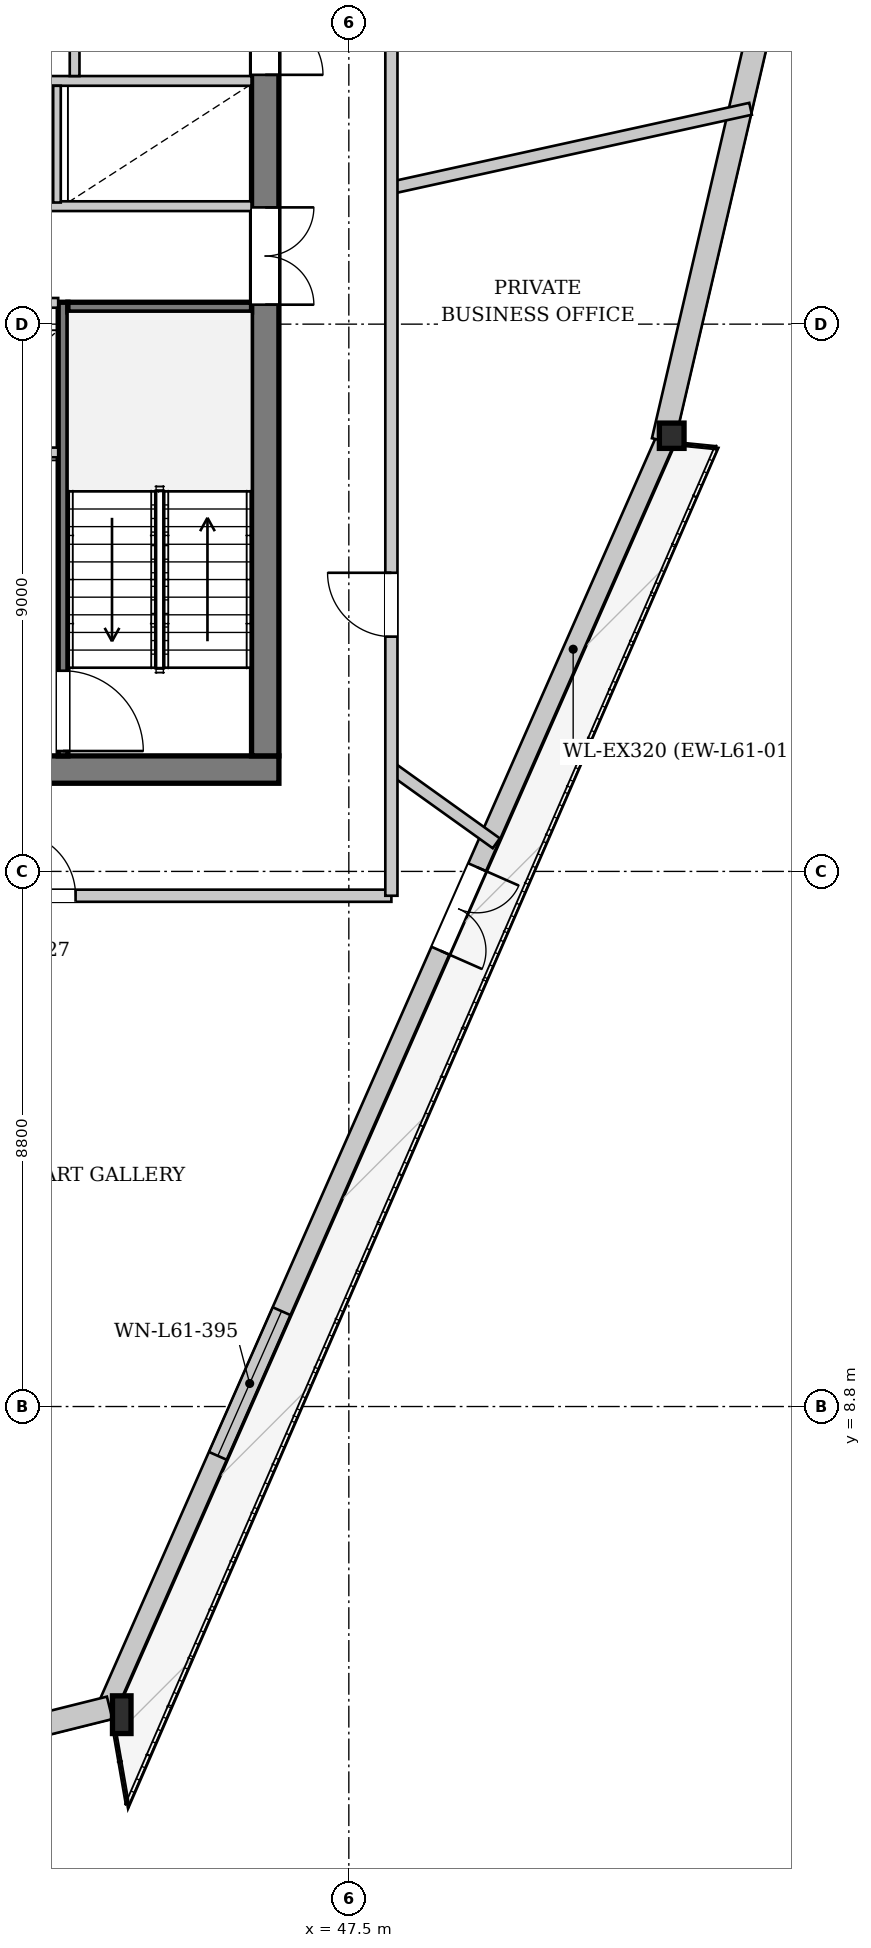
"""IFC4 building model, lengths in metres.
Left out: names, types, materials, properties, quantities, classifications, styles, units other than length and angle.
Written with IfcOpenShell. Run it as: python <this file> out.ifc"""

import sys

from ifc_helpers import new_model, si_unit, direction, frame, frame_2d, origin, origin_2d, place, context, subcontext, project, spatial, rectangle, i_section, extrude, source, transform, mapped, element, fill, save


model = new_model("IFC4")
c1 = context("Model", 3, precision=1e-05, world=origin(), true_north=direction((0.0, 1.0)))
c2 = subcontext(c1, "Body", "Model", "MODEL_VIEW")
j1 = project(units=[si_unit("LENGTHUNIT", "METRE"), si_unit("PLANEANGLEUNIT", "RADIAN")], contexts=[c1])
p1 = place(None, origin())
s1 = spatial("IfcSite", under=j1, at=p1, CompositionType="ELEMENT")
p2 = place(p1, origin())
s2 = spatial("IfcBuilding", under=s1, at=p2, CompositionType="ELEMENT")
p3 = place(p2, frame((0.0, 0.0, 230.9)))
s3 = spatial("IfcBuildingStorey", under=s2, at=p3, CompositionType="ELEMENT", Elevation=230.9)
m1 = source(origin(), c2, "Body", "SweptSolid", [
    extrude(i_section(OverallWidth=0.305, OverallDepth=0.62, WebThickness=0.021, FlangeThickness=0.04, at=origin_2d()), origin(), (0.0, 0.0, 1.0), 3.451),
])
p4 = place(p3, frame((43.613, 3.66, 0.0), z_axis=(0.088135401789, 0.041662722034, 0.995236840428), x_axis=(-0.427368834073, 0.90407736376, 0.0)))
e1 = element("IfcColumn", 1, at=p4, inside=s3, PredefinedType="COLUMN", context=c2, shape_type="MappedRepresentation", body=[
    mapped(m1, transform((0.0, 0.0, 0.0), x_axis=(1.0, 0.0, 0.0), y_axis=(0.0, 1.0, 0.0), z_axis=(0.0, 0.0, 1.0), scale=1.0)),
])
m2 = source(origin(), c2, "Body", "SweptSolid", [
    extrude(i_section(OverallWidth=0.406, OverallDepth=0.416, WebThickness=0.027, FlangeThickness=0.042, at=origin_2d()), origin(), (0.0, 0.0, 1.0), 3.446),
])
p5 = place(p3, frame((52.855, 24.637, 0.0), z_axis=(-0.025932889628, 0.073901649952, 0.996928298008), x_axis=(-0.943590064598, -0.331115976647, 0.0)))
e2 = element("IfcColumn", 2, at=p5, inside=s3, PredefinedType="COLUMN", context=c2, shape_type="MappedRepresentation", body=[
    mapped(m2, transform((0.0, 0.0, 0.0), x_axis=(1.0, 0.0, 0.0), y_axis=(0.0, 1.0, 0.0), z_axis=(0.0, 0.0, 1.0), scale=1.0)),
])
p6 = place(p3, frame((52.708, 24.702, 0.0), z_axis=(0.0, 0.0, 1.0), x_axis=(-0.403169735339, -0.915125217938, 0.0)))
e3 = element("IfcWall", 3, at=p6, inside=s3, PredefinedType="SOLIDWALL", context=c2, shape_type="SweptSolid", body=[
    extrude(rectangle(XDim=22.923, YDim=0.32, at=frame_2d((11.461, 0.0))), origin(), (0.0, 0.0, 1.0), 2.872),
])
p7 = place(p6, frame((7.685, 0.0, 0.0)))
e4 = element("IfcOpeningElement", 4, at=p7, cuts=e3, PredefinedType="OPENING", context=c2, shape_type="SweptSolid", body=[
    extrude(rectangle(XDim=1.5, YDim=2.3, at=frame_2d((0.75, 1.15))), frame((0.0, 0.17, 0.0), z_axis=(0.0, -1.0, 0.0), x_axis=(1.0, 0.0, 0.0)), (0.0, 0.0, 1.0), 0.34),
])
p8 = place(p6, frame((15.663, 0.0, 0.402)))
e5 = element("IfcOpeningElement", 5, at=p8, cuts=e3, PredefinedType="OPENING", context=c2, shape_type="SweptSolid", body=[
    extrude(rectangle(XDim=2.6, YDim=2.35, at=frame_2d((1.3, 1.175))), frame((0.0, 0.17, 0.0), z_axis=(0.0, -1.0, 0.0), x_axis=(1.0, 0.0, 0.0)), (0.0, 0.0, 1.0), 0.34),
])
p9 = place(p3, frame((43.567, 3.845, 0.0), z_axis=(0.0, 0.0, 1.0), x_axis=(-0.970284902679, -0.241965302541, 0.0)))
e6 = element("IfcWall", 6, at=p9, inside=s3, PredefinedType="SOLIDWALL", context=c2, shape_type="SweptSolid", body=[
    extrude(rectangle(XDim=3.626, YDim=0.38, at=frame_2d((1.813, 0.0))), origin(), (0.0, 0.0, 1.0), 2.872),
])
p10 = place(p3, frame((57.875, 47.004, 0.0), z_axis=(0.0, 0.0, 1.0), x_axis=(-0.227070358906, -0.973878355908, 0.0)))
e7 = element("IfcWall", 7, at=p10, inside=s3, PredefinedType="SOLIDWALL", context=c2, shape_type="SweptSolid", body=[
    extrude(rectangle(XDim=22.923, YDim=0.38, at=frame_2d((11.461, 0.0))), origin(), (0.0, 0.0, 1.0), 2.872),
])
p11 = place(p10, frame((5.318, 0.0, 0.502)))
e8 = element("IfcOpeningElement", 8, at=p11, cuts=e7, PredefinedType="OPENING", context=c2, shape_type="SweptSolid", body=[
    extrude(rectangle(XDim=2.2, YDim=2.25, at=frame_2d((1.1, 1.125))), frame((0.0, 0.2, 0.0), z_axis=(0.0, -1.0, 0.0), x_axis=(1.0, 0.0, 0.0)), (0.0, 0.0, 1.0), 0.4),
])
p12 = place(p10, frame((13.804, 0.0, 0.502)))
e9 = element("IfcOpeningElement", 9, at=p12, cuts=e7, PredefinedType="OPENING", context=c2, shape_type="SweptSolid", body=[
    extrude(rectangle(XDim=2.2, YDim=2.25, at=frame_2d((1.1, 1.125))), frame((0.0, 0.2, 0.0), z_axis=(0.0, -1.0, 0.0), x_axis=(1.0, 0.0, 0.0)), (0.0, 0.0, 1.0), 0.4),
])
p13 = place(p3, frame((46.35, 19.275, 0.0), z_axis=(0.0, 0.0, 1.0), x_axis=(-1.0, 0.0, 0.0)))
e10 = element("IfcWall", 10, at=p13, inside=s3, PredefinedType="SHEAR", context=c2, shape_type="SweptSolid", body=[
    extrude(rectangle(XDim=16.7, YDim=0.45, at=frame_2d((8.35, 0.0))), origin(), (0.0, 0.0, 1.0), 3.38),
])
p14 = place(p13, frame((4.55, 0.0, 0.0)))
e11 = element("IfcOpeningElement", 11, at=p14, cuts=e10, PredefinedType="OPENING", context=c2, shape_type="SweptSolid", body=[
    extrude(rectangle(XDim=1.12, YDim=2.25, at=frame_2d((0.56, 1.125))), frame((0.0, 0.235, 0.0), z_axis=(0.0, -1.0, 0.0), x_axis=(1.0, 0.0, 0.0)), (0.0, 0.0, 1.0), 0.47),
])
p15 = place(p13, frame((11.05, 0.0, 0.0)))
e12 = element("IfcOpeningElement", 12, at=p15, cuts=e10, PredefinedType="OPENING", context=c2, shape_type="SweptSolid", body=[
    extrude(rectangle(XDim=1.12, YDim=2.25, at=frame_2d((0.56, 1.125))), frame((0.0, 0.235, 0.0), z_axis=(0.0, -1.0, 0.0), x_axis=(1.0, 0.0, 0.0)), (0.0, 0.0, 1.0), 0.47),
])
p16 = place(p3, frame((46.125, 33.7, 0.0), z_axis=(0.0, 0.0, 1.0), x_axis=(0.0, -1.0, 0.0)))
e13 = element("IfcWall", 13, at=p16, inside=s3, PredefinedType="SHEAR", context=c2, shape_type="SweptSolid", body=[
    extrude(rectangle(XDim=14.2, YDim=0.45, at=frame_2d((7.1, 0.0))), origin(), (0.0, 0.0, 1.0), 3.38),
])
p17 = place(p16, frame((5.18, 0.0, 0.0)))
e14 = element("IfcOpeningElement", 14, at=p17, cuts=e13, PredefinedType="OPENING", context=c2, shape_type="SweptSolid", body=[
    extrude(rectangle(XDim=1.6, YDim=2.2, at=frame_2d((0.8, 1.1))), frame((0.0, 0.235, 0.0), z_axis=(0.0, -1.0, 0.0), x_axis=(1.0, 0.0, 0.0)), (0.0, 0.0, 1.0), 0.47),
])
p18 = place(p16, frame((2.05, 0.0, 0.0)))
e15 = element("IfcOpeningElement", 15, at=p18, cuts=e13, PredefinedType="OPENING", context=c2, shape_type="SweptSolid", body=[
    extrude(rectangle(XDim=0.95, YDim=2.1, at=frame_2d((0.475, 1.05))), frame((0.0, 0.235, 0.0), z_axis=(0.0, -1.0, 0.0), x_axis=(1.0, 0.0, 0.0)), (0.0, 0.0, 1.0), 0.47),
])
p19 = place(p3, frame((42.8, 26.96, 0.0), z_axis=(0.0, 0.0, 1.0), x_axis=(0.0, -1.0, 0.0)))
e16 = element("IfcWall", 16, at=p19, inside=s3, PredefinedType="PARTITIONING", context=c2, shape_type="SweptSolid", body=[
    extrude(rectangle(XDim=7.46, YDim=0.16, at=frame_2d((3.73, 0.0))), origin(), (0.0, 0.0, 1.0), 3.38),
])
p20 = place(p19, frame((6.06, 0.0, 0.0)))
e17 = element("IfcOpeningElement", 17, at=p20, cuts=e16, PredefinedType="OPENING", context=c2, shape_type="SweptSolid", body=[
    extrude(rectangle(XDim=1.32, YDim=2.2, at=frame_2d((0.66, 1.1))), frame((0.0, 0.09, 0.0), z_axis=(0.0, -1.0, 0.0), x_axis=(1.0, 0.0, 0.0)), (0.0, 0.0, 1.0), 0.18),
])
p21 = place(p3, frame((42.88, 26.88, 0.0), z_axis=(0.0, 0.0, 1.0), x_axis=(1.0, 0.0, 0.0)))
e18 = element("IfcWall", 18, at=p21, inside=s3, PredefinedType="PARTITIONING", context=c2, shape_type="SweptSolid", body=[
    extrude(rectangle(XDim=3.02, YDim=0.16, at=frame_2d((1.51, 0.0))), origin(), (0.0, 0.0, 1.0), 3.38),
])
p22 = place(p3, frame((33.28, 24.49, 0.0), z_axis=(0.0, 0.0, 1.0), x_axis=(1.0, 0.0, 0.0)))
e19 = element("IfcWall", 19, at=p22, inside=s3, PredefinedType="PARTITIONING", context=c2, shape_type="SweptSolid", body=[
    extrude(rectangle(XDim=9.44, YDim=0.16, at=frame_2d((4.72, 0.0))), origin(), (0.0, 0.0, 1.0), 3.38),
])
p23 = place(p3, frame((33.28, 26.95, 0.0), z_axis=(0.0, 0.0, 1.0), x_axis=(1.0, 0.0, 0.0)))
e20 = element("IfcWall", 20, at=p23, inside=s3, PredefinedType="PARTITIONING", context=c2, shape_type="SweptSolid", body=[
    extrude(rectangle(XDim=9.44, YDim=0.16, at=frame_2d((4.72, 0.0))), origin(), (0.0, 0.0, 1.0), 3.38),
])
p24 = place(p23, frame((1.2, 0.0, 0.0)))
e21 = element("IfcOpeningElement", 21, at=p24, cuts=e20, PredefinedType="OPENING", context=c2, shape_type="SweptSolid", body=[
    extrude(rectangle(XDim=0.95, YDim=2.1, at=frame_2d((0.475, 1.05))), frame((0.0, 0.09, 0.0), z_axis=(0.0, -1.0, 0.0), x_axis=(1.0, 0.0, 0.0)), (0.0, 0.0, 1.0), 0.18),
])
p25 = place(p23, frame((4.65, 0.0, 0.0)))
e22 = element("IfcOpeningElement", 22, at=p25, cuts=e20, PredefinedType="OPENING", context=c2, shape_type="SweptSolid", body=[
    extrude(rectangle(XDim=0.95, YDim=2.1, at=frame_2d((0.475, 1.05))), frame((0.0, 0.09, 0.0), z_axis=(0.0, -1.0, 0.0), x_axis=(1.0, 0.0, 0.0)), (0.0, 0.0, 1.0), 0.18),
])
p26 = place(p23, frame((7.67, 0.0, 0.0)))
e23 = element("IfcOpeningElement", 23, at=p26, cuts=e20, PredefinedType="OPENING", context=c2, shape_type="SweptSolid", body=[
    extrude(rectangle(XDim=1.1, YDim=2.2, at=frame_2d((0.55, 1.1))), frame((0.0, 0.09, 0.0), z_axis=(0.0, -1.0, 0.0), x_axis=(1.0, 0.0, 0.0)), (0.0, 0.0, 1.0), 0.18),
])
p27 = place(p3, frame((33.28, 28.54, 0.0), z_axis=(0.0, 0.0, 1.0), x_axis=(1.0, 0.0, 0.0)))
e24 = element("IfcWall", 24, at=p27, inside=s3, PredefinedType="PARTITIONING", context=c2, shape_type="SweptSolid", body=[
    extrude(rectangle(XDim=12.62, YDim=0.16, at=frame_2d((6.31, 0.0))), origin(), (0.0, 0.0, 1.0), 3.38),
])
p28 = place(p27, frame((0.26, 0.0, 0.0)))
e25 = element("IfcOpeningElement", 25, at=p28, cuts=e24, PredefinedType="OPENING", context=c2, shape_type="SweptSolid", body=[
    extrude(rectangle(XDim=1.1, YDim=2.2, at=frame_2d((0.55, 1.1))), frame((0.0, 0.09, 0.0), z_axis=(0.0, -1.0, 0.0), x_axis=(1.0, 0.0, 0.0)), (0.0, 0.0, 1.0), 0.18),
])
p29 = place(p27, frame((2.01, 0.0, 0.0)))
e26 = element("IfcOpeningElement", 26, at=p29, cuts=e24, PredefinedType="OPENING", context=c2, shape_type="SweptSolid", body=[
    extrude(rectangle(XDim=1.1, YDim=2.2, at=frame_2d((0.55, 1.1))), frame((0.0, 0.09, 0.0), z_axis=(0.0, -1.0, 0.0), x_axis=(1.0, 0.0, 0.0)), (0.0, 0.0, 1.0), 0.18),
])
p30 = place(p27, frame((3.76, 0.0, 0.0)))
e27 = element("IfcOpeningElement", 27, at=p30, cuts=e24, PredefinedType="OPENING", context=c2, shape_type="SweptSolid", body=[
    extrude(rectangle(XDim=1.1, YDim=2.2, at=frame_2d((0.55, 1.1))), frame((0.0, 0.09, 0.0), z_axis=(0.0, -1.0, 0.0), x_axis=(1.0, 0.0, 0.0)), (0.0, 0.0, 1.0), 0.18),
])
p31 = place(p3, frame((40.72, 30.6, 0.0), z_axis=(0.0, 0.0, 1.0), x_axis=(1.0, 0.0, 0.0)))
e28 = element("IfcWall", 28, at=p31, inside=s3, PredefinedType="PARTITIONING", context=c2, shape_type="SweptSolid", body=[
    extrude(rectangle(XDim=5.18, YDim=0.16, at=frame_2d((2.59, 0.0))), origin(), (0.0, 0.0, 1.0), 3.38),
])
p32 = place(p3, frame((42.7, 28.6, 0.0), z_axis=(0.0, 0.0, 1.0), x_axis=(0.0, 1.0, 0.0)))
e29 = element("IfcWall", 29, at=p32, inside=s3, PredefinedType="PARTITIONING", context=c2, shape_type="SweptSolid", body=[
    extrude(rectangle(XDim=1.92, YDim=0.125, at=frame_2d((0.96, 0.0))), origin(), (0.0, 0.0, 1.0), 3.38),
])
p33 = place(p3, frame((42.99, 30.68, 0.0), z_axis=(0.0, 0.0, 1.0), x_axis=(0.0, 1.0, 0.0)))
e30 = element("IfcWall", 30, at=p33, inside=s3, PredefinedType="PARTITIONING", context=c2, shape_type="SweptSolid", body=[
    extrude(rectangle(XDim=3.02, YDim=0.16, at=frame_2d((1.51, 0.0))), origin(), (0.0, 0.0, 1.0), 3.38),
])
p34 = place(p33, frame((0.95, 0.0, 0.0)))
e31 = element("IfcOpeningElement", 31, at=p34, cuts=e30, PredefinedType="OPENING", context=c2, shape_type="SweptSolid", body=[
    extrude(rectangle(XDim=0.95, YDim=2.1, at=frame_2d((0.475, 1.05))), frame((0.0, 0.09, 0.0), z_axis=(0.0, -1.0, 0.0), x_axis=(1.0, 0.0, 0.0)), (0.0, 0.0, 1.0), 0.18),
])
p35 = place(p3, frame((48.2, 19.298, 0.0), z_axis=(0.0, 0.0, 1.0), x_axis=(0.813072174006, -0.582162898043, 0.0)))
e32 = element("IfcWall", 32, at=p35, inside=s3, PredefinedType="PARTITIONING", context=c2, shape_type="SweptSolid", body=[
    extrude(rectangle(XDim=2.122, YDim=0.2, at=frame_2d((1.061, 0.0))), origin(), (0.0, 0.0, 1.0), 3.38),
])
p36 = place(p3, frame((48.2, 28.843, 0.0), z_axis=(0.0, 0.0, 1.0), x_axis=(0.976672748027, 0.214733190871, 0.0)))
e33 = element("IfcWall", 33, at=p36, inside=s3, PredefinedType="PARTITIONING", context=c2, shape_type="SweptSolid", body=[
    extrude(rectangle(XDim=6.049, YDim=0.2, at=frame_2d((3.024, 0.0))), origin(), (0.0, 0.0, 1.0), 3.38),
])
p37 = place(p3, frame((27.8, 17.2, 0.0), z_axis=(0.0, 0.0, 1.0), x_axis=(1.0, 0.0, 0.0)))
e34 = element("IfcWall", 34, at=p37, inside=s3, PredefinedType="PARTITIONING", context=c2, shape_type="SweptSolid", body=[
    extrude(rectangle(XDim=20.4, YDim=0.2, at=frame_2d((10.2, 0.0))), origin(), (0.0, 0.0, 1.0), 3.38),
])
p38 = place(p37, frame((7.336, 0.0, 0.0)))
e35 = element("IfcOpeningElement", 35, at=p38, cuts=e34, PredefinedType="OPENING", context=c2, shape_type="SweptSolid", body=[
    extrude(rectangle(XDim=1.05, YDim=2.2, at=frame_2d((0.525, 1.1))), frame((0.0, 0.11, 0.0), z_axis=(0.0, -1.0, 0.0), x_axis=(1.0, 0.0, 0.0)), (0.0, 0.0, 1.0), 0.22),
])
p39 = place(p37, frame((14.156, 0.0, 0.0)))
e36 = element("IfcOpeningElement", 36, at=p39, cuts=e34, PredefinedType="OPENING", context=c2, shape_type="SweptSolid", body=[
    extrude(rectangle(XDim=1.05, YDim=2.2, at=frame_2d((0.525, 1.1))), frame((0.0, 0.11, 0.0), z_axis=(0.0, -1.0, 0.0), x_axis=(1.0, 0.0, 0.0)), (0.0, 0.0, 1.0), 0.22),
])
p40 = place(p3, frame((48.2, 17.2, 0.0), z_axis=(0.0, 0.0, 1.0), x_axis=(0.0, 1.0, 0.0)))
e37 = element("IfcWall", 37, at=p40, inside=s3, PredefinedType="PARTITIONING", context=c2, shape_type="SweptSolid", body=[
    extrude(rectangle(XDim=18.8, YDim=0.2, at=frame_2d((9.4, 0.0))), origin(), (0.0, 0.0, 1.0), 3.005),
])
p41 = place(p40, frame((4.261, 0.0, 0.0)))
e38 = element("IfcOpeningElement", 38, at=p41, cuts=e37, PredefinedType="OPENING", context=c2, shape_type="SweptSolid", body=[
    extrude(rectangle(XDim=1.05, YDim=2.2, at=frame_2d((0.525, 1.1))), frame((0.0, 0.11, 0.0), z_axis=(0.0, -1.0, 0.0), x_axis=(1.0, 0.0, 0.0)), (0.0, 0.0, 1.0), 0.22),
])
p42 = place(p40, frame((17.45, 0.0, 0.0)))
e39 = element("IfcOpeningElement", 39, at=p42, cuts=e37, PredefinedType="OPENING", context=c2, shape_type="SweptSolid", body=[
    extrude(rectangle(XDim=1.05, YDim=2.2, at=frame_2d((0.525, 1.1))), frame((0.0, 0.11, 0.0), z_axis=(0.0, -1.0, 0.0), x_axis=(1.0, 0.0, 0.0)), (0.0, 0.0, 1.0), 0.22),
])
m3 = source(origin(), c2, "Body", "SweptSolid", [
    extrude(rectangle(XDim=1.5, YDim=2.3, at=frame_2d((0.75, 1.15))), frame((0.0, 0.025, 0.0), z_axis=(0.0, -1.0, 0.0), x_axis=(1.0, 0.0, 0.0)), (0.0, 0.0, 1.0), 0.05),
])
p43 = place(p7, origin())
e40 = element("IfcDoor", 40, at=p43, inside=s3, OperationType="DOUBLE_DOOR_SINGLE_SWING", PredefinedType="DOOR", context=c2, shape_type="MappedRepresentation", body=[
    mapped(m3, transform((0.0, 0.0, 0.0), x_axis=(1.0, 0.0, 0.0), y_axis=(0.0, 1.0, 0.0), z_axis=(0.0, 0.0, 1.0), scale=1.0)),
])
fill(e4, e40)
m4 = source(origin(), c2, "Body", "SweptSolid", [
    extrude(rectangle(XDim=2.6, YDim=2.35, at=frame_2d((1.3, 1.175))), frame((0.0, 0.03, 0.0), z_axis=(0.0, -1.0, 0.0), x_axis=(1.0, 0.0, 0.0)), (0.0, 0.0, 1.0), 0.06),
])
p44 = place(p8, origin())
e41 = element("IfcWindow", 41, at=p44, inside=s3, PartitioningType="SINGLE_PANEL", PredefinedType="WINDOW", context=c2, shape_type="MappedRepresentation", body=[
    mapped(m4, transform((0.0, 0.0, 0.0), x_axis=(1.0, 0.0, 0.0), y_axis=(0.0, 1.0, 0.0), z_axis=(0.0, 0.0, 1.0), scale=1.0)),
])
fill(e5, e41)
m5 = source(origin(), c2, "Body", "SweptSolid", [
    extrude(rectangle(XDim=1.6, YDim=2.2, at=frame_2d((0.8, 1.1))), frame((0.0, 0.025, 0.0), z_axis=(0.0, -1.0, 0.0), x_axis=(1.0, 0.0, 0.0)), (0.0, 0.0, 1.0), 0.05),
])
p45 = place(p17, origin())
e42 = element("IfcDoor", 42, at=p45, inside=s3, OperationType="DOUBLE_DOOR_SINGLE_SWING", PredefinedType="DOOR", context=c2, shape_type="MappedRepresentation", body=[
    mapped(m5, transform((0.0, 0.0, 0.0), x_axis=(1.0, 0.0, 0.0), y_axis=(0.0, 1.0, 0.0), z_axis=(0.0, 0.0, 1.0), scale=1.0)),
])
fill(e14, e42)
m6 = source(origin(), c2, "Body", "SweptSolid", [
    extrude(rectangle(XDim=1.32, YDim=2.2, at=frame_2d((0.66, 1.1))), frame((0.0, 0.025, 0.0), z_axis=(0.0, -1.0, 0.0), x_axis=(1.0, 0.0, 0.0)), (0.0, 0.0, 1.0), 0.05),
])
p46 = place(p20, origin())
e43 = element("IfcDoor", 43, at=p46, inside=s3, OperationType="SINGLE_SWING_RIGHT", PredefinedType="DOOR", context=c2, shape_type="MappedRepresentation", body=[
    mapped(m6, transform((0.0, 0.0, 0.0), x_axis=(1.0, 0.0, 0.0), y_axis=(0.0, 1.0, 0.0), z_axis=(0.0, 0.0, 1.0), scale=1.0)),
])
fill(e17, e43)
m7 = source(origin(), c2, "Body", "SweptSolid", [
    extrude(rectangle(XDim=0.95, YDim=2.1, at=frame_2d((0.475, 1.05))), frame((0.0, 0.025, 0.0), z_axis=(0.0, -1.0, 0.0), x_axis=(1.0, 0.0, 0.0)), (0.0, 0.0, 1.0), 0.05),
])
p47 = place(p18, origin())
e44 = element("IfcDoor", 44, at=p47, inside=s3, OperationType="SINGLE_SWING_RIGHT", PredefinedType="DOOR", context=c2, shape_type="MappedRepresentation", body=[
    mapped(m7, transform((0.0, 0.0, 0.0), x_axis=(1.0, 0.0, 0.0), y_axis=(0.0, 1.0, 0.0), z_axis=(0.0, 0.0, 1.0), scale=1.0)),
])
fill(e15, e44)
m8 = source(origin(), c2, "Body", "SweptSolid", [
    extrude(rectangle(XDim=1.05, YDim=2.2, at=frame_2d((0.525, 1.1))), frame((0.0, 0.025, 0.0), z_axis=(0.0, -1.0, 0.0), x_axis=(1.0, 0.0, 0.0)), (0.0, 0.0, 1.0), 0.05),
])
p48 = place(p39, origin())
e45 = element("IfcDoor", 45, at=p48, inside=s3, OperationType="SINGLE_SWING_LEFT", PredefinedType="DOOR", context=c2, shape_type="MappedRepresentation", body=[
    mapped(m8, transform((0.0, 0.0, 0.0), x_axis=(1.0, 0.0, 0.0), y_axis=(0.0, 1.0, 0.0), z_axis=(0.0, 0.0, 1.0), scale=1.0)),
])
fill(e36, e45)
p49 = place(p41, origin())
e46 = element("IfcDoor", 46, at=p49, inside=s3, OperationType="SINGLE_SWING_RIGHT", PredefinedType="DOOR", context=c2, shape_type="MappedRepresentation", body=[
    mapped(m8, transform((0.0, 0.0, 0.0), x_axis=(1.0, 0.0, 0.0), y_axis=(0.0, 1.0, 0.0), z_axis=(0.0, 0.0, 1.0), scale=1.0)),
])
fill(e38, e46)
save(model, sys.argv[1])
